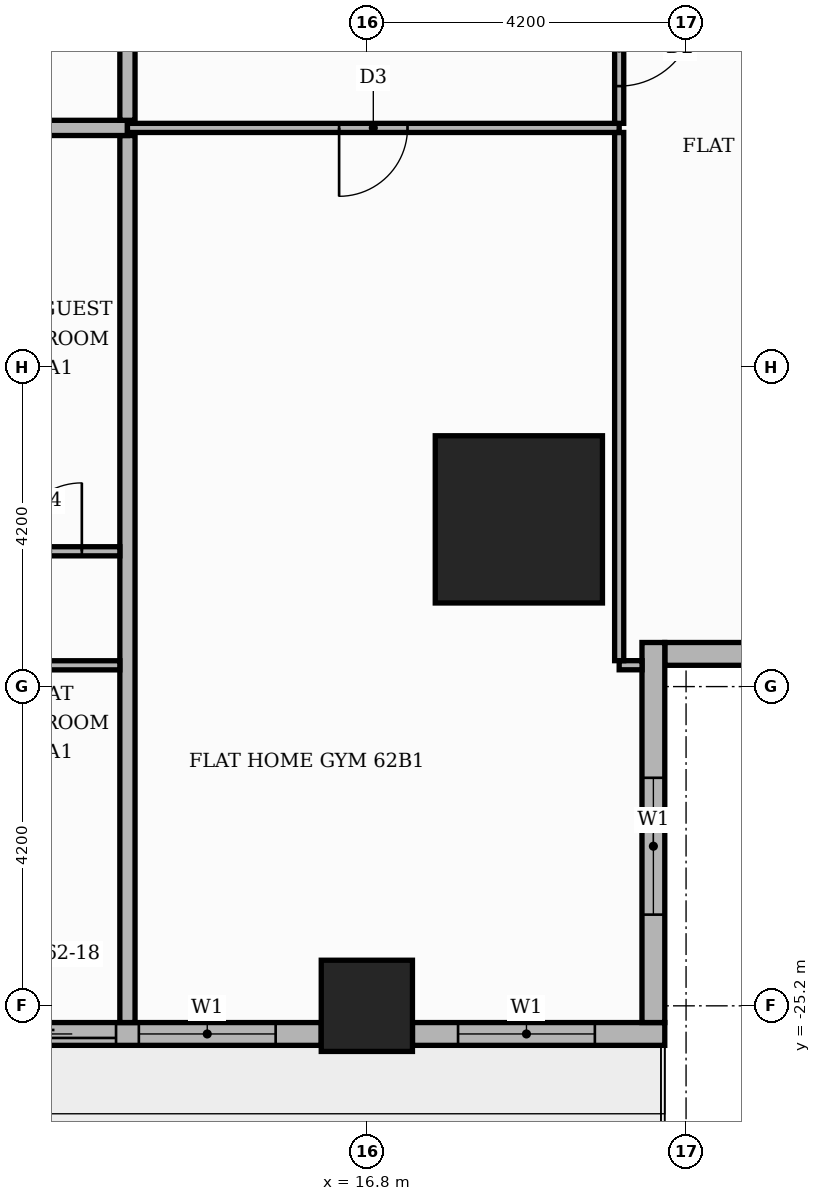
"""IFC4 building model, lengths in metres.
Left out: names, types, materials, properties, quantities, classifications, styles, units other than length and angle.
Written with IfcOpenShell. Run it as: python <this file> out.ifc"""

import sys

from ifc_helpers import new_model, si_unit, direction, frame, frame_2d, origin, origin_2d, place, context, subcontext, project, spatial, rectangle, extrude, element, fill, save


model = new_model("IFC4")
c1 = context("Model", 3, precision=1e-05, world=origin(), true_north=direction((0.0, 1.0)))
c2 = subcontext(c1, "Body", "Model", "MODEL_VIEW")
j1 = project(units=[si_unit("LENGTHUNIT", "METRE"), si_unit("PLANEANGLEUNIT", "RADIAN")], contexts=[c1])
p1 = place(None, origin())
s1 = spatial("IfcSite", under=j1, at=p1, CompositionType="ELEMENT")
p2 = place(p1, origin())
s2 = spatial("IfcBuilding", under=s1, at=p2, CompositionType="ELEMENT")
p3 = place(p2, frame((0.0, 0.0, 260.1)))
s3 = spatial("IfcBuildingStorey", under=s2, at=p3, CompositionType="ELEMENT", Elevation=260.1)
p4 = place(p3, frame((18.8, -18.8, 0.0), z_axis=(0.0, 0.0, 1.0), x_axis=(1.0, 0.0, 0.0)))
e1 = element("IfcColumn", 1, at=p4, inside=s3, PredefinedType="COLUMN", context=c2, shape_type="SweptSolid", body=[
    extrude(rectangle(XDim=2.2, YDim=2.2, at=origin_2d()), origin(), (0.0, 0.0, 1.0), 3.9),
])
p5 = place(p3, frame((16.8, -25.2, 0.0), z_axis=(0.0, 0.0, 1.0), x_axis=(1.0, 0.0, 0.0)))
e2 = element("IfcColumn", 2, at=p5, inside=s3, PredefinedType="COLUMN", context=c2, shape_type="SweptSolid", body=[
    extrude(rectangle(XDim=1.2, YDim=1.2, at=origin_2d()), origin(), (0.0, 0.0, 1.0), 3.9),
])
p6 = place(p3, frame((20.72, -20.57, 0.0), z_axis=(0.0, 0.0, 1.0), x_axis=(1.0, 0.0, 0.0)))
e3 = element("IfcWall", 3, at=p6, inside=s3, PredefinedType="STANDARD", context=c2, shape_type="SweptSolid", body=[
    extrude(rectangle(XDim=5.0, YDim=0.3, at=frame_2d((2.5, 0.0))), origin(), (0.0, 0.0, 1.0), 3.48),
])
p7 = place(p6, frame((1.48, 0.0, 0.9)))
e4 = element("IfcOpeningElement", 4, at=p7, cuts=e3, PredefinedType="OPENING", context=c2, shape_type="SweptSolid", body=[
    extrude(rectangle(XDim=1.8, YDim=2.1, at=frame_2d((0.9, 1.05))), frame((0.0, 0.16, 0.0), z_axis=(0.0, -1.0, 0.0), x_axis=(1.0, 0.0, 0.0)), (0.0, 0.0, 1.0), 0.32),
])
p8 = place(p3, frame((9.0, -25.57, 0.0), z_axis=(0.0, 0.0, 1.0), x_axis=(1.0, 0.0, 0.0)))
e5 = element("IfcWall", 5, at=p8, inside=s3, PredefinedType="STANDARD", context=c2, shape_type="SweptSolid", body=[
    extrude(rectangle(XDim=7.2, YDim=0.3, at=frame_2d((3.6, 0.0))), origin(), (0.0, 0.0, 1.0), 3.48),
])
p9 = place(p8, frame((0.6, 0.0, 0.9)))
e6 = element("IfcOpeningElement", 6, at=p9, cuts=e5, PredefinedType="OPENING", context=c2, shape_type="SweptSolid", body=[
    extrude(rectangle(XDim=1.8, YDim=2.1, at=frame_2d((0.9, 1.05))), frame((0.0, 0.16, 0.0), z_axis=(0.0, -1.0, 0.0), x_axis=(1.0, 0.0, 0.0)), (0.0, 0.0, 1.0), 0.32),
])
p10 = place(p8, frame((2.7, 0.0, 0.0)))
e7 = element("IfcOpeningElement", 7, at=p10, cuts=e5, PredefinedType="OPENING", context=c2, shape_type="SweptSolid", body=[
    extrude(rectangle(XDim=1.8, YDim=2.4, at=frame_2d((0.9, 1.2))), frame((0.0, 0.16, 0.0), z_axis=(0.0, -1.0, 0.0), x_axis=(1.0, 0.0, 0.0)), (0.0, 0.0, 1.0), 0.32),
])
p11 = place(p8, frame((4.8, 0.0, 0.9)))
e8 = element("IfcOpeningElement", 8, at=p11, cuts=e5, PredefinedType="OPENING", context=c2, shape_type="SweptSolid", body=[
    extrude(rectangle(XDim=1.8, YDim=2.1, at=frame_2d((0.9, 1.05))), frame((0.0, 0.16, 0.0), z_axis=(0.0, -1.0, 0.0), x_axis=(1.0, 0.0, 0.0)), (0.0, 0.0, 1.0), 0.32),
])
p12 = place(p3, frame((17.4, -25.57, 0.0), z_axis=(0.0, 0.0, 1.0), x_axis=(1.0, 0.0, 0.0)))
e9 = element("IfcWall", 9, at=p12, inside=s3, PredefinedType="STANDARD", context=c2, shape_type="SweptSolid", body=[
    extrude(rectangle(XDim=3.32, YDim=0.3, at=frame_2d((1.66, 0.0))), origin(), (0.0, 0.0, 1.0), 3.48),
])
p13 = place(p12, frame((0.6, 0.0, 0.9)))
e10 = element("IfcOpeningElement", 10, at=p13, cuts=e9, PredefinedType="OPENING", context=c2, shape_type="SweptSolid", body=[
    extrude(rectangle(XDim=1.8, YDim=2.1, at=frame_2d((0.9, 1.05))), frame((0.0, 0.16, 0.0), z_axis=(0.0, -1.0, 0.0), x_axis=(1.0, 0.0, 0.0)), (0.0, 0.0, 1.0), 0.32),
])
p14 = place(p3, frame((20.57, -25.42, 0.0), z_axis=(0.0, 0.0, 1.0), x_axis=(0.0, 1.0, 0.0)))
e11 = element("IfcWall", 11, at=p14, inside=s3, PredefinedType="STANDARD", context=c2, shape_type="SweptSolid", body=[
    extrude(rectangle(XDim=5.0, YDim=0.3, at=frame_2d((2.5, 0.0))), origin(), (0.0, 0.0, 1.0), 3.48),
])
p15 = place(p14, frame((1.42, 0.0, 0.9)))
e12 = element("IfcOpeningElement", 12, at=p15, cuts=e11, PredefinedType="OPENING", context=c2, shape_type="SweptSolid", body=[
    extrude(rectangle(XDim=1.8, YDim=2.1, at=frame_2d((0.9, 1.05))), frame((0.0, 0.16, 0.0), z_axis=(0.0, -1.0, 0.0), x_axis=(1.0, 0.0, 0.0)), (0.0, 0.0, 1.0), 0.32),
])
p16 = place(p3, frame((13.65, -25.42, 0.0), z_axis=(0.0, 0.0, 1.0), x_axis=(0.0, 1.0, 0.0)))
e13 = element("IfcWall", 13, at=p16, inside=s3, PredefinedType="PARTITIONING", context=c2, shape_type="SweptSolid", body=[
    extrude(rectangle(XDim=11.67, YDim=0.2, at=frame_2d((5.835, 0.0))), origin(), (0.0, 0.0, 1.0), 3.48),
])
p17 = place(p3, frame((7.65, -20.72, 0.0), z_axis=(0.0, 0.0, 1.0), x_axis=(1.0, 0.0, 0.0)))
e14 = element("IfcWall", 14, at=p17, inside=s3, PredefinedType="PARTITIONING", context=c2, shape_type="SweptSolid", body=[
    extrude(rectangle(XDim=5.9, YDim=0.12, at=frame_2d((2.95, 0.0))), origin(), (0.0, 0.0, 1.0), 3.48),
])
p18 = place(p17, frame((1.35, 0.0, 0.0)))
e15 = element("IfcOpeningElement", 15, at=p18, cuts=e14, PredefinedType="OPENING", context=c2, shape_type="SweptSolid", body=[
    extrude(rectangle(XDim=0.9, YDim=2.1, at=frame_2d((0.45, 1.05))), frame((0.0, 0.07, 0.0), z_axis=(0.0, -1.0, 0.0), x_axis=(1.0, 0.0, 0.0)), (0.0, 0.0, 1.0), 0.14),
])
p19 = place(p3, frame((20.12, -20.719, 0.0), z_axis=(0.0, 0.0, 1.0), x_axis=(1.0, 0.0, 0.0)))
e16 = element("IfcWall", 16, at=p19, inside=s3, PredefinedType="PARTITIONING", context=c2, shape_type="SweptSolid", body=[
    extrude(rectangle(XDim=0.301, YDim=0.12, at=frame_2d((0.15, 0.0))), origin(), (0.0, 0.0, 1.0), 3.48),
])
p20 = place(p3, frame((20.12, -20.659, 0.0), z_axis=(0.0, 0.0, 1.0), x_axis=(0.0, 1.0, 0.0)))
e17 = element("IfcWall", 17, at=p20, inside=s3, PredefinedType="PARTITIONING", context=c2, shape_type="SweptSolid", body=[
    extrude(rectangle(XDim=6.949, YDim=0.12, at=frame_2d((3.475, 0.0))), origin(), (0.0, 0.0, 1.0), 3.48),
])
p21 = place(p3, frame((-7.35, -19.22, 0.0), z_axis=(0.0, 0.0, 1.0), x_axis=(1.0, 0.0, 0.0)))
e18 = element("IfcWall", 18, at=p21, inside=s3, PredefinedType="PARTITIONING", context=c2, shape_type="SweptSolid", body=[
    extrude(rectangle(XDim=20.9, YDim=0.12, at=frame_2d((10.45, 0.0))), origin(), (0.0, 0.0, 1.0), 3.48),
])
p22 = place(p21, frame((2.7, 0.0, 0.0)))
e19 = element("IfcOpeningElement", 19, at=p22, cuts=e18, PredefinedType="OPENING", context=c2, shape_type="SweptSolid", body=[
    extrude(rectangle(XDim=0.9, YDim=2.1, at=frame_2d((0.45, 1.05))), frame((0.0, 0.07, 0.0), z_axis=(0.0, -1.0, 0.0), x_axis=(1.0, 0.0, 0.0)), (0.0, 0.0, 1.0), 0.14),
])
p23 = place(p21, frame((7.95, 0.0, 0.0)))
e20 = element("IfcOpeningElement", 20, at=p23, cuts=e18, PredefinedType="OPENING", context=c2, shape_type="SweptSolid", body=[
    extrude(rectangle(XDim=0.9, YDim=2.1, at=frame_2d((0.45, 1.05))), frame((0.0, 0.07, 0.0), z_axis=(0.0, -1.0, 0.0), x_axis=(1.0, 0.0, 0.0)), (0.0, 0.0, 1.0), 0.14),
])
p24 = place(p21, frame((13.05, 0.0, 0.0)))
e21 = element("IfcOpeningElement", 21, at=p24, cuts=e18, PredefinedType="OPENING", context=c2, shape_type="SweptSolid", body=[
    extrude(rectangle(XDim=0.9, YDim=2.1, at=frame_2d((0.45, 1.05))), frame((0.0, 0.07, 0.0), z_axis=(0.0, -1.0, 0.0), x_axis=(1.0, 0.0, 0.0)), (0.0, 0.0, 1.0), 0.14),
])
p25 = place(p21, frame((17.25, 0.0, 0.0)))
e22 = element("IfcOpeningElement", 22, at=p25, cuts=e18, PredefinedType="OPENING", context=c2, shape_type="SweptSolid", body=[
    extrude(rectangle(XDim=0.9, YDim=2.1, at=frame_2d((0.45, 1.05))), frame((0.0, 0.07, 0.0), z_axis=(0.0, -1.0, 0.0), x_axis=(1.0, 0.0, 0.0)), (0.0, 0.0, 1.0), 0.14),
])
p26 = place(p21, frame((19.5, 0.0, 0.0)))
e23 = element("IfcOpeningElement", 23, at=p26, cuts=e18, PredefinedType="OPENING", context=c2, shape_type="SweptSolid", body=[
    extrude(rectangle(XDim=0.9, YDim=2.1, at=frame_2d((0.45, 1.05))), frame((0.0, 0.07, 0.0), z_axis=(0.0, -1.0, 0.0), x_axis=(1.0, 0.0, 0.0)), (0.0, 0.0, 1.0), 0.14),
])
p27 = place(p3, frame((-25.42, -13.65, 0.0), z_axis=(0.0, 0.0, 1.0), x_axis=(1.0, 0.0, 0.0)))
e24 = element("IfcWall", 24, at=p27, inside=s3, PredefinedType="PARTITIONING", context=c2, shape_type="SweptSolid", body=[
    extrude(rectangle(XDim=39.07, YDim=0.2, at=frame_2d((19.535, 0.0))), origin(), (0.0, 0.0, 1.0), 3.48),
])
p28 = place(p27, frame((14.37, 0.0, 0.0)))
e25 = element("IfcOpeningElement", 25, at=p28, cuts=e24, PredefinedType="OPENING", context=c2, shape_type="SweptSolid", body=[
    extrude(rectangle(XDim=1.1, YDim=2.4, at=frame_2d((0.55, 1.2))), frame((0.0, 0.11, 0.0), z_axis=(0.0, -1.0, 0.0), x_axis=(1.0, 0.0, 0.0)), (0.0, 0.0, 1.0), 0.22),
])
p29 = place(p3, frame((13.65, -13.65, 0.0), z_axis=(0.0, 0.0, 1.0), x_axis=(1.0, 0.0, 0.0)))
e26 = element("IfcWall", 26, at=p29, inside=s3, PredefinedType="PARTITIONING", context=c2, shape_type="SweptSolid", body=[
    extrude(rectangle(XDim=6.47, YDim=0.12, at=frame_2d((3.235, 0.0))), origin(), (0.0, 0.0, 1.0), 3.48),
])
p30 = place(p29, frame((2.785, 0.0, 0.0)))
e27 = element("IfcOpeningElement", 27, at=p30, cuts=e26, PredefinedType="OPENING", context=c2, shape_type="SweptSolid", body=[
    extrude(rectangle(XDim=0.9, YDim=2.1, at=frame_2d((0.45, 1.05))), frame((0.0, 0.07, 0.0), z_axis=(0.0, -1.0, 0.0), x_axis=(1.0, 0.0, 0.0)), (0.0, 0.0, 1.0), 0.14),
])
p31 = place(p3, frame((20.12, -13.59, 0.0), z_axis=(0.0, 0.0, 1.0), x_axis=(0.0, 1.0, 0.0)))
e28 = element("IfcWall", 28, at=p31, inside=s3, PredefinedType="PARTITIONING", context=c2, shape_type="SweptSolid", body=[
    extrude(rectangle(XDim=1.98, YDim=0.12, at=frame_2d((0.99, 0.0))), origin(), (0.0, 0.0, 1.0), 3.48),
])
p32 = place(p31, frame((0.49, 0.0, 0.0)))
e29 = element("IfcOpeningElement", 29, at=p32, cuts=e28, PredefinedType="OPENING", context=c2, shape_type="SweptSolid", body=[
    extrude(rectangle(XDim=1.0, YDim=2.1, at=frame_2d((0.5, 1.05))), frame((0.0, 0.07, 0.0), z_axis=(0.0, -1.0, 0.0), x_axis=(1.0, 0.0, 0.0)), (0.0, 0.0, 1.0), 0.14),
])
p33 = place(p3, frame((13.65, -13.55, 0.0), z_axis=(0.0, 0.0, 1.0), x_axis=(0.0, 1.0, 0.0)))
e30 = element("IfcWall", 30, at=p33, inside=s3, PredefinedType="PARTITIONING", context=c2, shape_type="SweptSolid", body=[
    extrude(rectangle(XDim=2.45, YDim=0.2, at=frame_2d((1.225, 0.0))), origin(), (0.0, 0.0, 1.0), 3.48),
])
p34 = place(p10, origin())
e31 = element("IfcDoor", 31, at=p34, inside=s3, OperationType="SLIDING_TO_RIGHT", PredefinedType="DOOR", context=c2, shape_type="SweptSolid", body=[
    extrude(rectangle(XDim=1.8, YDim=2.4, at=frame_2d((0.9, 1.2))), frame((0.0, 0.025, 0.0), z_axis=(0.0, -1.0, 0.0), x_axis=(1.0, 0.0, 0.0)), (0.0, 0.0, 1.0), 0.05),
])
fill(e7, e31)
p35 = place(p11, origin())
e32 = element("IfcWindow", 32, at=p35, inside=s3, PartitioningType="SINGLE_PANEL", PredefinedType="WINDOW", context=c2, shape_type="SweptSolid", body=[
    extrude(rectangle(XDim=1.8, YDim=2.1, at=frame_2d((0.9, 1.05))), frame((0.0, 0.03, 0.0), z_axis=(0.0, -1.0, 0.0), x_axis=(1.0, 0.0, 0.0)), (0.0, 0.0, 1.0), 0.06),
])
fill(e8, e32)
p36 = place(p13, origin())
e33 = element("IfcWindow", 33, at=p36, inside=s3, PartitioningType="SINGLE_PANEL", PredefinedType="WINDOW", context=c2, shape_type="SweptSolid", body=[
    extrude(rectangle(XDim=1.8, YDim=2.1, at=frame_2d((0.9, 1.05))), frame((0.0, 0.03, 0.0), z_axis=(0.0, -1.0, 0.0), x_axis=(1.0, 0.0, 0.0)), (0.0, 0.0, 1.0), 0.06),
])
fill(e10, e33)
p37 = place(p15, origin())
e34 = element("IfcWindow", 34, at=p37, inside=s3, PartitioningType="SINGLE_PANEL", PredefinedType="WINDOW", context=c2, shape_type="SweptSolid", body=[
    extrude(rectangle(XDim=1.8, YDim=2.1, at=frame_2d((0.9, 1.05))), frame((0.0, 0.03, 0.0), z_axis=(0.0, -1.0, 0.0), x_axis=(1.0, 0.0, 0.0)), (0.0, 0.0, 1.0), 0.06),
])
fill(e12, e34)
p38 = place(p26, origin())
e35 = element("IfcDoor", 35, at=p38, inside=s3, OperationType="SINGLE_SWING_RIGHT", PredefinedType="DOOR", context=c2, shape_type="SweptSolid", body=[
    extrude(rectangle(XDim=0.9, YDim=2.1, at=frame_2d((0.45, 1.05))), frame((0.0, 0.025, 0.0), z_axis=(0.0, -1.0, 0.0), x_axis=(1.0, 0.0, 0.0)), (0.0, 0.0, 1.0), 0.05),
])
fill(e23, e35)
p39 = place(p30, frame((0.9, 0.0, 0.0), z_axis=(0.0, 0.0, 1.0), x_axis=(-1.0, 0.0, 0.0)))
e36 = element("IfcDoor", 36, at=p39, inside=s3, OperationType="SINGLE_SWING_LEFT", PredefinedType="DOOR", context=c2, shape_type="SweptSolid", body=[
    extrude(rectangle(XDim=0.9, YDim=2.1, at=frame_2d((0.45, 1.05))), frame((0.0, 0.025, 0.0), z_axis=(0.0, -1.0, 0.0), x_axis=(1.0, 0.0, 0.0)), (0.0, 0.0, 1.0), 0.05),
])
fill(e27, e36)
p40 = place(p32, frame((1.0, 0.0, 0.0), z_axis=(0.0, 0.0, 1.0), x_axis=(-1.0, 0.0, 0.0)))
e37 = element("IfcDoor", 37, at=p40, inside=s3, OperationType="SINGLE_SWING_RIGHT", PredefinedType="DOOR", context=c2, shape_type="SweptSolid", body=[
    extrude(rectangle(XDim=1.0, YDim=2.1, at=frame_2d((0.5, 1.05))), frame((0.0, 0.025, 0.0), z_axis=(0.0, -1.0, 0.0), x_axis=(1.0, 0.0, 0.0)), (0.0, 0.0, 1.0), 0.05),
])
fill(e29, e37)
save(model, sys.argv[1])
